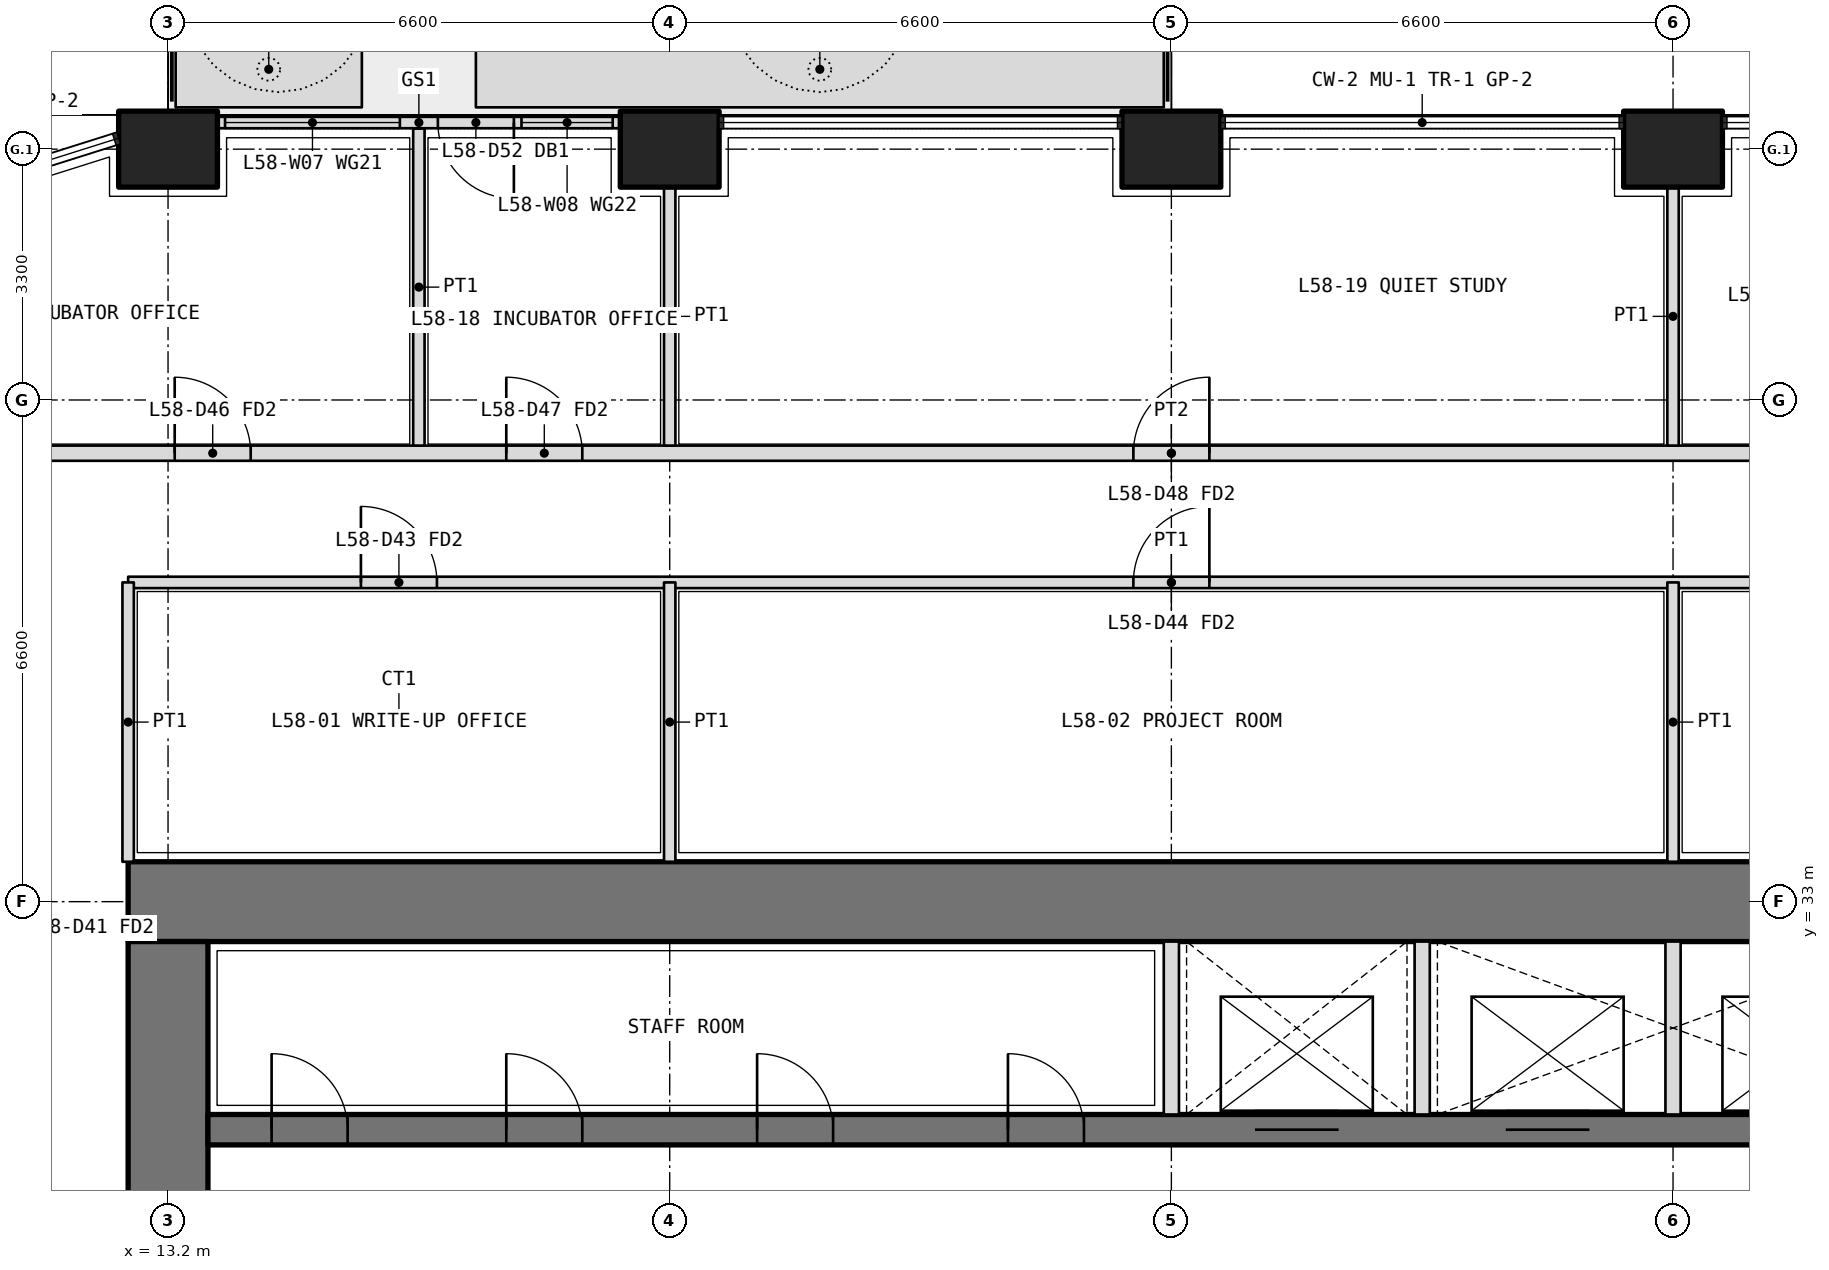
"""IFC4 building model, lengths in metres.
Left out: names, types, materials, properties, quantities, classifications, styles, units other than length and angle.
Written with IfcOpenShell. Run it as: python <this file> out.ifc"""

import sys

from ifc_helpers import new_model, si_unit, direction, frame, frame_2d, origin, origin_2d, place, context, subcontext, project, spatial, polyline, rectangle, outline, extrude, element, fill, save


model = new_model("IFC4")
c1 = context("Model", 3, precision=1e-05, world=origin(), true_north=direction((0.0, 1.0)))
c2 = subcontext(c1, "Body", "Model", "MODEL_VIEW")
j1 = project(units=[si_unit("LENGTHUNIT", "METRE"), si_unit("PLANEANGLEUNIT", "RADIAN")], contexts=[c1])
p1 = place(None, origin())
s1 = spatial("IfcSite", under=j1, at=p1, CompositionType="ELEMENT")
p2 = place(p1, origin())
s2 = spatial("IfcBuilding", under=s1, at=p2, CompositionType="ELEMENT")
p3 = place(p2, frame((0.0, 0.0, 254.4)))
s3 = spatial("IfcBuildingStorey", under=s2, at=p3, CompositionType="ELEMENT", Elevation=254.4)
for number, where, z_axis, x_axis in (
    (1, (13.2, 42.9, 0.0), (0.0, 0.0, 1.0), (1.0, 0.0, 0.0)),
    (2, (19.8, 42.9, 0.0), (0.0, 0.0, 1.0), (1.0, 0.0, 0.0)),
    (3, (26.4, 42.9, 0.0), (0.0, 0.0, 1.0), (1.0, 0.0, 0.0)),
    (4, (33.0, 42.9, 0.0), (0.0, 0.0, 1.0), (1.0, 0.0, 0.0)),
):
    element("IfcColumn", number, at=place(p3, frame(where, z_axis=z_axis, x_axis=x_axis)), inside=s3, PredefinedType="COLUMN", context=c2, shape_type="SweptSolid", body=[
        extrude(rectangle(XDim=1.3, YDim=1.0, at=origin_2d()), origin(), (0.0, 0.0, 1.0), 4.2),
    ])
p4 = place(p3, origin())
e5 = element("IfcWall", 5, at=p4, inside=s3, PredefinedType="USERDEFINED", context=c2, shape_type="SweptSolid", body=[
    extrude(outline(polyline([(13.3, 43.45), (15.75, 43.45), (15.75, 44.45), (13.3, 44.45), (13.3, 43.45)]), holes=[polyline([(13.45, 43.6), (15.6, 43.6), (15.6, 44.3), (13.45, 44.3), (13.45, 43.6)])]), origin(), (0.0, 0.0, 1.0), 1.05),
])
p5 = place(p3, origin())
e6 = element("IfcWall", 6, at=p5, inside=s3, PredefinedType="USERDEFINED", context=c2, shape_type="SweptSolid", body=[
    extrude(outline(polyline([(17.25, 43.45), (26.3, 43.45), (26.3, 44.45), (17.25, 44.45), (17.25, 43.45)]), holes=[polyline([(17.4, 43.6), (26.15, 43.6), (26.15, 44.3), (17.4, 44.3), (17.4, 43.6)])]), origin(), (0.0, 0.0, 1.0), 1.05),
])
p6 = place(p3, frame((19.15, 43.25, 0.0), z_axis=(0.0, 0.0, 1.0), x_axis=(-1.0, 0.0, 0.0)))
e7 = element("IfcWall", 7, at=p6, inside=s3, PredefinedType="SOLIDWALL", context=c2, shape_type="SweptSolid", body=[
    extrude(rectangle(XDim=5.3, YDim=0.15, at=frame_2d((2.65, 0.0))), origin(), (0.0, 0.0, 1.0), 2.7),
])
p7 = place(p6, frame((1.4, 0.0, 0.0)))
e8 = element("IfcOpeningElement", 8, at=p7, cuts=e7, PredefinedType="OPENING", context=c2, shape_type="SweptSolid", body=[
    extrude(rectangle(XDim=1.0, YDim=2.4, at=frame_2d((0.5, 1.2))), frame((0.0, 0.085, 0.0), z_axis=(0.0, -1.0, 0.0), x_axis=(1.0, 0.0, 0.0)), (0.0, 0.0, 1.0), 0.17),
])
p8 = place(p6, frame((0.1, 0.0, 0.1)))
e9 = element("IfcOpeningElement", 9, at=p8, cuts=e7, PredefinedType="OPENING", context=c2, shape_type="SweptSolid", body=[
    extrude(rectangle(XDim=1.2, YDim=2.3, at=frame_2d((0.6, 1.15))), frame((0.0, 0.085, 0.0), z_axis=(0.0, -1.0, 0.0), x_axis=(1.0, 0.0, 0.0)), (0.0, 0.0, 1.0), 0.17),
])
p9 = place(p6, frame((2.9, 0.0, 0.1)))
e10 = element("IfcOpeningElement", 10, at=p9, cuts=e7, PredefinedType="OPENING", context=c2, shape_type="SweptSolid", body=[
    extrude(rectangle(XDim=2.3, YDim=2.3, at=frame_2d((1.15, 1.15))), frame((0.0, 0.085, 0.0), z_axis=(0.0, -1.0, 0.0), x_axis=(1.0, 0.0, 0.0)), (0.0, 0.0, 1.0), 0.17),
])
p10 = place(p3, frame((40.125, 33.0, 0.0), z_axis=(0.0, 0.0, 1.0), x_axis=(-1.0, 0.0, 0.0)))
e11 = element("IfcWall", 11, at=p10, inside=s3, PredefinedType="SHEAR", context=c2, shape_type="SweptSolid", body=[
    extrude(rectangle(XDim=27.45, YDim=1.05, at=frame_2d((13.725, 0.0))), origin(), (0.0, 0.0, 1.0), 4.2),
])
p11 = place(p3, frame((13.2, 32.475, 0.0), z_axis=(0.0, 0.0, 1.0), x_axis=(0.0, -1.0, 0.0)))
e12 = element("IfcWall", 12, at=p11, inside=s3, PredefinedType="SHEAR", context=c2, shape_type="SweptSolid", body=[
    extrude(rectangle(XDim=18.75, YDim=1.05, at=frame_2d((9.375, 0.0))), origin(), (0.0, 0.0, 1.0), 4.2),
])
p12 = place(p11, frame((14.125, 0.0, 0.0)))
e13 = element("IfcOpeningElement", 13, at=p12, cuts=e12, PredefinedType="OPENING", context=c2, shape_type="SweptSolid", body=[
    extrude(rectangle(XDim=1.6, YDim=2.1, at=frame_2d((0.8, 1.05))), frame((0.0, 0.535, 0.0), z_axis=(0.0, -1.0, 0.0), x_axis=(1.0, 0.0, 0.0)), (0.0, 0.0, 1.0), 1.07),
])
p13 = place(p11, frame((3.325, 0.0, 0.0)))
e14 = element("IfcOpeningElement", 14, at=p13, cuts=e12, PredefinedType="OPENING", context=c2, shape_type="SweptSolid", body=[
    extrude(rectangle(XDim=1.6, YDim=2.1, at=frame_2d((0.8, 1.05))), frame((0.0, 0.535, 0.0), z_axis=(0.0, -1.0, 0.0), x_axis=(1.0, 0.0, 0.0)), (0.0, 0.0, 1.0), 1.07),
])
p14 = place(p3, frame((13.725, 30.0, 0.0), z_axis=(0.0, 0.0, 1.0), x_axis=(1.0, 0.0, 0.0)))
e15 = element("IfcWall", 15, at=p14, inside=s3, PredefinedType="SHEAR", context=c2, shape_type="SweptSolid", body=[
    extrude(rectangle(XDim=25.35, YDim=0.4, at=frame_2d((12.675, 0.0))), origin(), (0.0, 0.0, 1.0), 4.2),
])
p15 = place(p14, frame((0.837, 0.0, 0.0)))
e16 = element("IfcOpeningElement", 16, at=p15, cuts=e15, PredefinedType="OPENING", context=c2, shape_type="SweptSolid", body=[
    extrude(rectangle(XDim=1.0, YDim=2.1, at=frame_2d((0.5, 1.05))), frame((0.0, 0.21, 0.0), z_axis=(0.0, -1.0, 0.0), x_axis=(1.0, 0.0, 0.0)), (0.0, 0.0, 1.0), 0.42),
])
p16 = place(p14, frame((3.925, 0.0, 0.0)))
e17 = element("IfcOpeningElement", 17, at=p16, cuts=e15, PredefinedType="OPENING", context=c2, shape_type="SweptSolid", body=[
    extrude(rectangle(XDim=1.0, YDim=2.1, at=frame_2d((0.5, 1.05))), frame((0.0, 0.21, 0.0), z_axis=(0.0, -1.0, 0.0), x_axis=(1.0, 0.0, 0.0)), (0.0, 0.0, 1.0), 0.42),
])
p17 = place(p14, frame((7.225, 0.0, 0.0)))
e18 = element("IfcOpeningElement", 18, at=p17, cuts=e15, PredefinedType="OPENING", context=c2, shape_type="SweptSolid", body=[
    extrude(rectangle(XDim=1.0, YDim=2.1, at=frame_2d((0.5, 1.05))), frame((0.0, 0.21, 0.0), z_axis=(0.0, -1.0, 0.0), x_axis=(1.0, 0.0, 0.0)), (0.0, 0.0, 1.0), 0.42),
])
p18 = place(p14, frame((10.525, 0.0, 0.0)))
e19 = element("IfcOpeningElement", 19, at=p18, cuts=e15, PredefinedType="OPENING", context=c2, shape_type="SweptSolid", body=[
    extrude(rectangle(XDim=1.0, YDim=2.1, at=frame_2d((0.5, 1.05))), frame((0.0, 0.21, 0.0), z_axis=(0.0, -1.0, 0.0), x_axis=(1.0, 0.0, 0.0)), (0.0, 0.0, 1.0), 0.42),
])
p19 = place(p14, frame((13.775, 0.0, 0.0)))
e20 = element("IfcOpeningElement", 20, at=p19, cuts=e15, PredefinedType="OPENING", context=c2, shape_type="SweptSolid", body=[
    extrude(rectangle(XDim=1.1, YDim=2.1, at=frame_2d((0.55, 1.05))), frame((0.0, 0.21, 0.0), z_axis=(0.0, -1.0, 0.0), x_axis=(1.0, 0.0, 0.0)), (0.0, 0.0, 1.0), 0.42),
])
p20 = place(p14, frame((17.075, 0.0, 0.0)))
e21 = element("IfcOpeningElement", 21, at=p20, cuts=e15, PredefinedType="OPENING", context=c2, shape_type="SweptSolid", body=[
    extrude(rectangle(XDim=1.1, YDim=2.1, at=frame_2d((0.55, 1.05))), frame((0.0, 0.21, 0.0), z_axis=(0.0, -1.0, 0.0), x_axis=(1.0, 0.0, 0.0)), (0.0, 0.0, 1.0), 0.42),
])
p21 = place(p14, frame((20.375, 0.0, 0.0)))
e22 = element("IfcOpeningElement", 22, at=p21, cuts=e15, PredefinedType="OPENING", context=c2, shape_type="SweptSolid", body=[
    extrude(rectangle(XDim=1.1, YDim=2.1, at=frame_2d((0.55, 1.05))), frame((0.0, 0.21, 0.0), z_axis=(0.0, -1.0, 0.0), x_axis=(1.0, 0.0, 0.0)), (0.0, 0.0, 1.0), 0.42),
])
p22 = place(p14, frame((23.462, 0.0, 0.0)))
e23 = element("IfcOpeningElement", 23, at=p22, cuts=e15, PredefinedType="OPENING", context=c2, shape_type="SweptSolid", body=[
    extrude(rectangle(XDim=1.1, YDim=2.1, at=frame_2d((0.55, 1.05))), frame((0.0, 0.21, 0.0), z_axis=(0.0, -1.0, 0.0), x_axis=(1.0, 0.0, 0.0)), (0.0, 0.0, 1.0), 0.42),
])
for number, where, z_axis, x_axis in (
    (24, (26.4, 30.2, 0.0), (0.0, 0.0, 1.0), (0.0, 1.0, 0.0)),
    (25, (29.7, 30.2, 0.0), (0.0, 0.0, 1.0), (0.0, 1.0, 0.0)),
    (26, (33.0, 30.2, 0.0), (0.0, 0.0, 1.0), (0.0, 1.0, 0.0)),
):
    element("IfcWall", number, at=place(p3, frame(where, z_axis=z_axis, x_axis=x_axis)), inside=s3, PredefinedType="PARTITIONING", context=c2, shape_type="SweptSolid", body=[
        extrude(rectangle(XDim=2.275, YDim=0.2, at=frame_2d((1.138, 0.0))), origin(), (0.0, 0.0, 1.0), 4.2),
    ])
p23 = place(p3, frame((12.675, 37.2, 0.0), z_axis=(0.0, 0.0, 1.0), x_axis=(1.0, 0.0, 0.0)))
e27 = element("IfcWall", 27, at=p23, inside=s3, PredefinedType="PARTITIONING", context=c2, shape_type="SweptSolid", body=[
    extrude(rectangle(XDim=27.45, YDim=0.15, at=frame_2d((13.725, 0.0))), origin(), (0.0, 0.0, 1.0), 3.0),
])
p24 = place(p23, frame((3.062, 0.0, 0.0)))
e28 = element("IfcOpeningElement", 28, at=p24, cuts=e27, PredefinedType="OPENING", context=c2, shape_type="SweptSolid", body=[
    extrude(rectangle(XDim=1.0, YDim=2.1, at=frame_2d((0.5, 1.05))), frame((0.0, 0.085, 0.0), z_axis=(0.0, -1.0, 0.0), x_axis=(1.0, 0.0, 0.0)), (0.0, 0.0, 1.0), 0.17),
])
p25 = place(p23, frame((13.225, 0.0, 0.0)))
e29 = element("IfcOpeningElement", 29, at=p25, cuts=e27, PredefinedType="OPENING", context=c2, shape_type="SweptSolid", body=[
    extrude(rectangle(XDim=1.0, YDim=2.1, at=frame_2d((0.5, 1.05))), frame((0.0, 0.085, 0.0), z_axis=(0.0, -1.0, 0.0), x_axis=(1.0, 0.0, 0.0)), (0.0, 0.0, 1.0), 0.17),
])
p26 = place(p23, frame((23.387, 0.0, 0.0)))
e30 = element("IfcOpeningElement", 30, at=p26, cuts=e27, PredefinedType="OPENING", context=c2, shape_type="SweptSolid", body=[
    extrude(rectangle(XDim=1.0, YDim=2.1, at=frame_2d((0.5, 1.05))), frame((0.0, 0.085, 0.0), z_axis=(0.0, -1.0, 0.0), x_axis=(1.0, 0.0, 0.0)), (0.0, 0.0, 1.0), 0.17),
])
for number, where, z_axis, x_axis in (
    (31, (12.675, 33.525, 0.0), (0.0, 0.0, 1.0), (0.0, 1.0, 0.0)),
    (32, (19.8, 33.525, 0.0), (0.0, 0.0, 1.0), (0.0, 1.0, 0.0)),
    (33, (33.0, 33.525, 0.0), (0.0, 0.0, 1.0), (0.0, 1.0, 0.0)),
):
    element("IfcWall", number, at=place(p3, frame(where, z_axis=z_axis, x_axis=x_axis)), inside=s3, PredefinedType="PARTITIONING", context=c2, shape_type="SweptSolid", body=[
        extrude(rectangle(XDim=3.675, YDim=0.15, at=frame_2d((1.837, 0.0))), origin(), (0.0, 0.0, 1.0), 3.0),
    ])
p27 = place(p3, frame((10.975, 38.9, 0.0), z_axis=(0.0, 0.0, 1.0), x_axis=(1.0, 0.0, 0.0)))
e34 = element("IfcWall", 34, at=p27, inside=s3, PredefinedType="PARTITIONING", context=c2, shape_type="SweptSolid", body=[
    extrude(rectangle(XDim=30.85, YDim=0.2, at=frame_2d((15.425, 0.0))), origin(), (0.0, 0.0, 1.0), 3.0),
])
p28 = place(p27, frame((2.312, 0.0, 0.0)))
e35 = element("IfcOpeningElement", 35, at=p28, cuts=e34, PredefinedType="OPENING", context=c2, shape_type="SweptSolid", body=[
    extrude(rectangle(XDim=1.0, YDim=2.1, at=frame_2d((0.5, 1.05))), frame((0.0, 0.11, 0.0), z_axis=(0.0, -1.0, 0.0), x_axis=(1.0, 0.0, 0.0)), (0.0, 0.0, 1.0), 0.22),
])
p29 = place(p27, frame((6.675, 0.0, 0.0)))
e36 = element("IfcOpeningElement", 36, at=p29, cuts=e34, PredefinedType="OPENING", context=c2, shape_type="SweptSolid", body=[
    extrude(rectangle(XDim=1.0, YDim=2.1, at=frame_2d((0.5, 1.05))), frame((0.0, 0.11, 0.0), z_axis=(0.0, -1.0, 0.0), x_axis=(1.0, 0.0, 0.0)), (0.0, 0.0, 1.0), 0.22),
])
p30 = place(p27, frame((14.925, 0.0, 0.0)))
e37 = element("IfcOpeningElement", 37, at=p30, cuts=e34, PredefinedType="OPENING", context=c2, shape_type="SweptSolid", body=[
    extrude(rectangle(XDim=1.0, YDim=2.1, at=frame_2d((0.5, 1.05))), frame((0.0, 0.11, 0.0), z_axis=(0.0, -1.0, 0.0), x_axis=(1.0, 0.0, 0.0)), (0.0, 0.0, 1.0), 0.22),
])
p31 = place(p27, frame((23.625, 0.0, 0.0)))
e38 = element("IfcOpeningElement", 38, at=p31, cuts=e34, PredefinedType="OPENING", context=c2, shape_type="SweptSolid", body=[
    extrude(rectangle(XDim=1.0, YDim=2.1, at=frame_2d((0.5, 1.05))), frame((0.0, 0.11, 0.0), z_axis=(0.0, -1.0, 0.0), x_axis=(1.0, 0.0, 0.0)), (0.0, 0.0, 1.0), 0.22),
])
p32 = place(p27, frame((26.925, 0.0, 0.0)))
e39 = element("IfcOpeningElement", 39, at=p32, cuts=e34, PredefinedType="OPENING", context=c2, shape_type="SweptSolid", body=[
    extrude(rectangle(XDim=1.0, YDim=2.1, at=frame_2d((0.5, 1.05))), frame((0.0, 0.11, 0.0), z_axis=(0.0, -1.0, 0.0), x_axis=(1.0, 0.0, 0.0)), (0.0, 0.0, 1.0), 0.22),
])
p33 = place(p27, frame((29.087, 0.0, 0.0)))
e40 = element("IfcOpeningElement", 40, at=p33, cuts=e34, PredefinedType="OPENING", context=c2, shape_type="SweptSolid", body=[
    extrude(rectangle(XDim=1.2, YDim=2.1, at=frame_2d((0.6, 1.05))), frame((0.0, 0.11, 0.0), z_axis=(0.0, -1.0, 0.0), x_axis=(1.0, 0.0, 0.0)), (0.0, 0.0, 1.0), 0.22),
])
p34 = place(p3, frame((16.5, 43.17, 0.0), z_axis=(0.0, 0.0, 1.0), x_axis=(0.0, -1.0, 0.0)))
e41 = element("IfcWall", 41, at=p34, inside=s3, PredefinedType="PARTITIONING", context=c2, shape_type="SweptSolid", body=[
    extrude(rectangle(XDim=4.17, YDim=0.15, at=frame_2d((2.085, 0.0))), origin(), (0.0, 0.0, 1.0), 2.7),
])
for number, where, z_axis, x_axis in (
    (42, (19.8, 42.4, 0.0), (0.0, 0.0, 1.0), (0.0, -1.0, 0.0)),
    (43, (33.0, 42.4, 0.0), (0.0, 0.0, 1.0), (0.0, -1.0, 0.0)),
):
    element("IfcWall", number, at=place(p3, frame(where, z_axis=z_axis, x_axis=x_axis)), inside=s3, PredefinedType="PARTITIONING", context=c2, shape_type="SweptSolid", body=[
        extrude(rectangle(XDim=3.4, YDim=0.15, at=frame_2d((1.7, 0.0))), origin(), (0.0, 0.0, 1.0), 3.0),
    ])
p35 = place(p7, origin())
e44 = element("IfcDoor", 44, at=p35, inside=s3, OperationType="SINGLE_SWING_LEFT", PredefinedType="DOOR", context=c2, shape_type="SweptSolid", body=[
    extrude(rectangle(XDim=1.0, YDim=2.4, at=frame_2d((0.5, 1.2))), frame((0.0, 0.025, 0.0), z_axis=(0.0, -1.0, 0.0), x_axis=(1.0, 0.0, 0.0)), (0.0, 0.0, 1.0), 0.05),
])
fill(e8, e44)
p36 = place(p8, origin())
e45 = element("IfcWindow", 45, at=p36, inside=s3, PartitioningType="SINGLE_PANEL", PredefinedType="WINDOW", context=c2, shape_type="SweptSolid", body=[
    extrude(rectangle(XDim=1.2, YDim=2.3, at=frame_2d((0.6, 1.15))), frame((0.0, 0.03, 0.0), z_axis=(0.0, -1.0, 0.0), x_axis=(1.0, 0.0, 0.0)), (0.0, 0.0, 1.0), 0.06),
])
fill(e9, e45)
p37 = place(p9, origin())
e46 = element("IfcWindow", 46, at=p37, inside=s3, PartitioningType="SINGLE_PANEL", PredefinedType="WINDOW", context=c2, shape_type="SweptSolid", body=[
    extrude(rectangle(XDim=2.3, YDim=2.3, at=frame_2d((1.15, 1.15))), frame((0.0, 0.03, 0.0), z_axis=(0.0, -1.0, 0.0), x_axis=(1.0, 0.0, 0.0)), (0.0, 0.0, 1.0), 0.06),
])
fill(e10, e46)
p38 = place(p24, origin())
e47 = element("IfcDoor", 47, at=p38, inside=s3, OperationType="SINGLE_SWING_LEFT", PredefinedType="DOOR", context=c2, shape_type="SweptSolid", body=[
    extrude(rectangle(XDim=1.0, YDim=2.1, at=frame_2d((0.5, 1.05))), frame((0.0, 0.025, 0.0), z_axis=(0.0, -1.0, 0.0), x_axis=(1.0, 0.0, 0.0)), (0.0, 0.0, 1.0), 0.05),
])
fill(e28, e47)
p39 = place(p25, origin())
e48 = element("IfcDoor", 48, at=p39, inside=s3, OperationType="SINGLE_SWING_RIGHT", PredefinedType="DOOR", context=c2, shape_type="SweptSolid", body=[
    extrude(rectangle(XDim=1.0, YDim=2.1, at=frame_2d((0.5, 1.05))), frame((0.0, 0.025, 0.0), z_axis=(0.0, -1.0, 0.0), x_axis=(1.0, 0.0, 0.0)), (0.0, 0.0, 1.0), 0.05),
])
fill(e29, e48)
p40 = place(p28, origin())
e49 = element("IfcDoor", 49, at=p40, inside=s3, OperationType="SINGLE_SWING_LEFT", PredefinedType="DOOR", context=c2, shape_type="SweptSolid", body=[
    extrude(rectangle(XDim=1.0, YDim=2.1, at=frame_2d((0.5, 1.05))), frame((0.0, 0.025, 0.0), z_axis=(0.0, -1.0, 0.0), x_axis=(1.0, 0.0, 0.0)), (0.0, 0.0, 1.0), 0.05),
])
fill(e35, e49)
p41 = place(p29, origin())
e50 = element("IfcDoor", 50, at=p41, inside=s3, OperationType="SINGLE_SWING_LEFT", PredefinedType="DOOR", context=c2, shape_type="SweptSolid", body=[
    extrude(rectangle(XDim=1.0, YDim=2.1, at=frame_2d((0.5, 1.05))), frame((0.0, 0.025, 0.0), z_axis=(0.0, -1.0, 0.0), x_axis=(1.0, 0.0, 0.0)), (0.0, 0.0, 1.0), 0.05),
])
fill(e36, e50)
p42 = place(p30, origin())
e51 = element("IfcDoor", 51, at=p42, inside=s3, OperationType="SINGLE_SWING_RIGHT", PredefinedType="DOOR", context=c2, shape_type="SweptSolid", body=[
    extrude(rectangle(XDim=1.0, YDim=2.1, at=frame_2d((0.5, 1.05))), frame((0.0, 0.025, 0.0), z_axis=(0.0, -1.0, 0.0), x_axis=(1.0, 0.0, 0.0)), (0.0, 0.0, 1.0), 0.05),
])
fill(e37, e51)
p43 = place(p15, origin())
e52 = element("IfcDoor", 52, at=p43, inside=s3, OperationType="SINGLE_SWING_LEFT", PredefinedType="DOOR", context=c2, shape_type="SweptSolid", body=[
    extrude(rectangle(XDim=1.0, YDim=2.1, at=frame_2d((0.5, 1.05))), frame((0.0, 0.025, 0.0), z_axis=(0.0, -1.0, 0.0), x_axis=(1.0, 0.0, 0.0)), (0.0, 0.0, 1.0), 0.05),
])
fill(e16, e52)
p44 = place(p16, origin())
e53 = element("IfcDoor", 53, at=p44, inside=s3, OperationType="SINGLE_SWING_LEFT", PredefinedType="DOOR", context=c2, shape_type="SweptSolid", body=[
    extrude(rectangle(XDim=1.0, YDim=2.1, at=frame_2d((0.5, 1.05))), frame((0.0, 0.025, 0.0), z_axis=(0.0, -1.0, 0.0), x_axis=(1.0, 0.0, 0.0)), (0.0, 0.0, 1.0), 0.05),
])
fill(e17, e53)
p45 = place(p17, origin())
e54 = element("IfcDoor", 54, at=p45, inside=s3, OperationType="SINGLE_SWING_LEFT", PredefinedType="DOOR", context=c2, shape_type="SweptSolid", body=[
    extrude(rectangle(XDim=1.0, YDim=2.1, at=frame_2d((0.5, 1.05))), frame((0.0, 0.025, 0.0), z_axis=(0.0, -1.0, 0.0), x_axis=(1.0, 0.0, 0.0)), (0.0, 0.0, 1.0), 0.05),
])
fill(e18, e54)
p46 = place(p18, origin())
e55 = element("IfcDoor", 55, at=p46, inside=s3, OperationType="SINGLE_SWING_LEFT", PredefinedType="DOOR", context=c2, shape_type="SweptSolid", body=[
    extrude(rectangle(XDim=1.0, YDim=2.1, at=frame_2d((0.5, 1.05))), frame((0.0, 0.025, 0.0), z_axis=(0.0, -1.0, 0.0), x_axis=(1.0, 0.0, 0.0)), (0.0, 0.0, 1.0), 0.05),
])
fill(e19, e55)
p47 = place(p19, origin())
e56 = element("IfcDoor", 56, at=p47, inside=s3, OperationType="DOUBLE_DOOR_SLIDING", PredefinedType="DOOR", context=c2, shape_type="SweptSolid", body=[
    extrude(rectangle(XDim=1.1, YDim=2.1, at=frame_2d((0.55, 1.05))), frame((0.0, 0.025, 0.0), z_axis=(0.0, -1.0, 0.0), x_axis=(1.0, 0.0, 0.0)), (0.0, 0.0, 1.0), 0.05),
])
fill(e20, e56)
p48 = place(p20, origin())
e57 = element("IfcDoor", 57, at=p48, inside=s3, OperationType="DOUBLE_DOOR_SLIDING", PredefinedType="DOOR", context=c2, shape_type="SweptSolid", body=[
    extrude(rectangle(XDim=1.1, YDim=2.1, at=frame_2d((0.55, 1.05))), frame((0.0, 0.025, 0.0), z_axis=(0.0, -1.0, 0.0), x_axis=(1.0, 0.0, 0.0)), (0.0, 0.0, 1.0), 0.05),
])
fill(e21, e57)
save(model, sys.argv[1])
